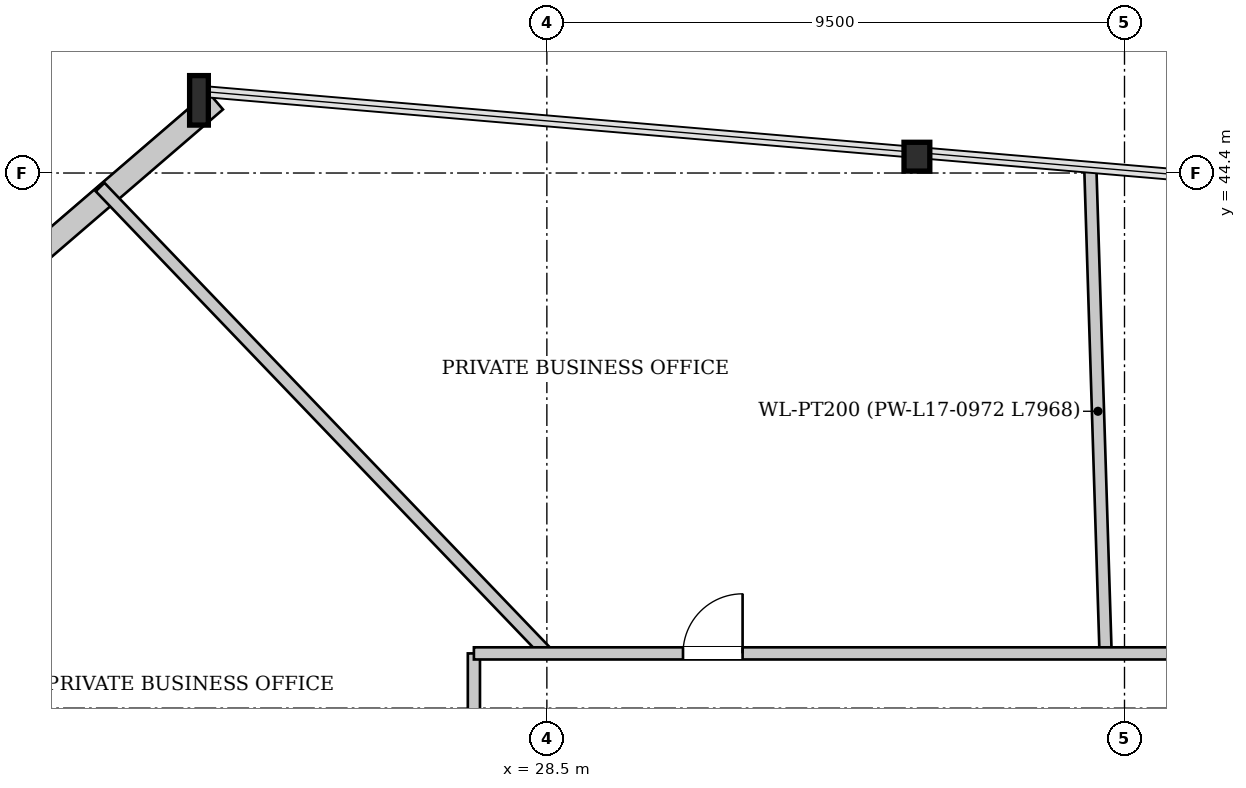
"""IFC4 building model, lengths in metres.
Left out: names, types, materials, properties, quantities, classifications, styles, units other than length and angle.
Written with IfcOpenShell. Run it as: python <this file> out.ifc"""

import sys

from ifc_helpers import new_model, si_unit, direction, frame, frame_2d, origin, origin_2d, place, context, subcontext, project, spatial, rectangle, i_section, extrude, source, transform, mapped, element, fill, save


model = new_model("IFC4")
c1 = context("Model", 3, precision=1e-05, world=origin(), true_north=direction((0.0, 1.0)))
c2 = subcontext(c1, "Body", "Model", "MODEL_VIEW")
j1 = project(units=[si_unit("LENGTHUNIT", "METRE"), si_unit("PLANEANGLEUNIT", "RADIAN")], contexts=[c1])
p1 = place(None, origin())
s1 = spatial("IfcSite", under=j1, at=p1, CompositionType="ELEMENT")
p2 = place(p1, origin())
s2 = spatial("IfcBuilding", under=s1, at=p2, CompositionType="ELEMENT")
p3 = place(p2, frame((0.0, 0.0, 68.35)))
s3 = spatial("IfcBuildingStorey", under=s2, at=p3, CompositionType="ELEMENT", Elevation=68.35)
m1 = source(origin(), c2, "Body", "SweptSolid", [
    extrude(i_section(OverallWidth=0.424, OverallDepth=0.474, WebThickness=0.043, FlangeThickness=0.068, at=origin_2d()), origin(), (0.0, 0.0, 1.0), 3.4),
])
p4 = place(p3, frame((34.734, 44.725, 0.0), z_axis=(-0.087319185608, -0.033247354389, 0.995625418142), x_axis=(0.355835526265, -0.93454859598, 0.0)))
e1 = element("IfcColumn", 1, at=p4, inside=s3, PredefinedType="COLUMN", context=c2, shape_type="MappedRepresentation", body=[
    mapped(m1, transform((0.0, 0.0, 0.0), x_axis=(1.0, 0.0, 0.0), y_axis=(0.0, 1.0, 0.0), z_axis=(0.0, 0.0, 1.0), scale=1.0)),
])
m2 = source(origin(), c2, "Body", "SweptSolid", [
    extrude(i_section(OverallWidth=0.308, OverallDepth=0.814, WebThickness=0.021, FlangeThickness=0.04, at=origin_2d()), origin(), (0.0, 0.0, 1.0), 3.409),
])
p5 = place(p3, frame((22.925, 45.734, 0.0), z_axis=(-0.086153434575, -0.081426812229, 0.992948770059), x_axis=(0.686889577708, -0.726761795939, 0.0)))
e2 = element("IfcColumn", 2, at=p5, inside=s3, PredefinedType="COLUMN", context=c2, shape_type="MappedRepresentation", body=[
    mapped(m2, transform((0.0, 0.0, 0.0), x_axis=(1.0, 0.0, 0.0), y_axis=(0.0, 1.0, 0.0), z_axis=(0.0, 0.0, 1.0), scale=1.0)),
])
p6 = place(p3, frame((18.425, 41.612, 0.0), z_axis=(0.0, 0.0, 1.0), x_axis=(0.758105656075, 0.652131746066, 0.0)))
e3 = element("IfcWall", 3, at=p6, inside=s3, PredefinedType="SOLIDWALL", context=c2, shape_type="SweptSolid", body=[
    extrude(rectangle(XDim=6.1, YDim=0.38, at=frame_2d((3.05, 0.0))), origin(), (0.0, 0.0, 1.0), 2.592),
])
p7 = place(p3, frame((37.689, 36.5, 0.0), z_axis=(0.0, 0.0, 1.0), x_axis=(-0.031407900808, 0.999506650186, 0.0)))
e4 = element("IfcWall", 4, at=p7, inside=s3, PredefinedType="PARTITIONING", context=c2, shape_type="SweptSolid", body=[
    extrude(rectangle(XDim=7.968, YDim=0.2, at=frame_2d((3.984, 0.0))), origin(), (0.0, 0.0, 1.0), 3.3),
])
p8 = place(p3, frame((28.506, 36.5, 0.0), z_axis=(0.0, 0.0, 1.0), x_axis=(-0.692130904917, 0.721771993402, 0.0)))
e5 = element("IfcWall", 5, at=p8, inside=s3, PredefinedType="PARTITIONING", context=c2, shape_type="SweptSolid", body=[
    extrude(rectangle(XDim=10.625, YDim=0.2, at=frame_2d((5.312, 0.0))), origin(), (0.0, 0.0, 1.0), 3.3),
])
p9 = place(p3, frame((27.3, 16.7, 0.0), z_axis=(0.0, 0.0, 1.0), x_axis=(0.0, 1.0, 0.0)))
e6 = element("IfcWall", 6, at=p9, inside=s3, PredefinedType="PARTITIONING", context=c2, shape_type="SweptSolid", body=[
    extrude(rectangle(XDim=19.8, YDim=0.2, at=frame_2d((9.9, 0.0))), origin(), (0.0, 0.0, 1.0), 3.3),
])
p10 = place(p9, frame((15.13, 0.0, 0.0)))
e7 = element("IfcOpeningElement", 7, at=p10, cuts=e6, PredefinedType="OPENING", context=c2, shape_type="SweptSolid", body=[
    extrude(rectangle(XDim=0.98, YDim=2.15, at=frame_2d((0.49, 1.075))), frame((0.0, 0.11, 0.0), z_axis=(0.0, -1.0, 0.0), x_axis=(1.0, 0.0, 0.0)), (0.0, 0.0, 1.0), 0.22),
])
p11 = place(p9, frame((3.667, 0.0, 0.0)))
e8 = element("IfcOpeningElement", 8, at=p11, cuts=e6, PredefinedType="OPENING", context=c2, shape_type="SweptSolid", body=[
    extrude(rectangle(XDim=0.98, YDim=2.15, at=frame_2d((0.49, 1.075))), frame((0.0, 0.11, 0.0), z_axis=(0.0, -1.0, 0.0), x_axis=(1.0, 0.0, 0.0)), (0.0, 0.0, 1.0), 0.22),
])
p12 = place(p3, frame((27.3, 36.5, 0.0), z_axis=(0.0, 0.0, 1.0), x_axis=(1.0, 0.0, 0.0)))
e9 = element("IfcWall", 9, at=p12, inside=s3, PredefinedType="PARTITIONING", context=c2, shape_type="SweptSolid", body=[
    extrude(rectangle(XDim=21.4, YDim=0.2, at=frame_2d((10.7, 0.0))), origin(), (0.0, 0.0, 1.0), 3.3),
])
p13 = place(p12, frame((3.439, 0.0, 0.0)))
e10 = element("IfcOpeningElement", 10, at=p13, cuts=e9, PredefinedType="OPENING", context=c2, shape_type="SweptSolid", body=[
    extrude(rectangle(XDim=0.98, YDim=2.15, at=frame_2d((0.49, 1.075))), frame((0.0, 0.11, 0.0), z_axis=(0.0, -1.0, 0.0), x_axis=(1.0, 0.0, 0.0)), (0.0, 0.0, 1.0), 0.22),
])
p14 = place(p12, frame((20.12, 0.0, 0.0)))
e11 = element("IfcOpeningElement", 11, at=p14, cuts=e9, PredefinedType="OPENING", context=c2, shape_type="SweptSolid", body=[
    extrude(rectangle(XDim=0.98, YDim=2.15, at=frame_2d((0.49, 1.075))), frame((0.0, 0.11, 0.0), z_axis=(0.0, -1.0, 0.0), x_axis=(1.0, 0.0, 0.0)), (0.0, 0.0, 1.0), 0.22),
])
p15 = place(p12, frame((13.104, 0.0, 0.0)))
e12 = element("IfcOpeningElement", 12, at=p15, cuts=e9, PredefinedType="OPENING", context=c2, shape_type="SweptSolid", body=[
    extrude(rectangle(XDim=0.98, YDim=2.15, at=frame_2d((0.49, 1.075))), frame((0.0, 0.11, 0.0), z_axis=(0.0, -1.0, 0.0), x_axis=(1.0, 0.0, 0.0)), (0.0, 0.0, 1.0), 0.22),
])
m3 = source(origin(), c2, "Body", "SweptSolid", [
    extrude(rectangle(XDim=0.98, YDim=2.15, at=frame_2d((0.49, 1.075))), frame((0.0, 0.025, 0.0), z_axis=(0.0, -1.0, 0.0), x_axis=(1.0, 0.0, 0.0)), (0.0, 0.0, 1.0), 0.05),
])
p16 = place(p13, origin())
e13 = element("IfcDoor", 13, at=p16, inside=s3, OperationType="SINGLE_SWING_RIGHT", PredefinedType="DOOR", context=c2, shape_type="MappedRepresentation", body=[
    mapped(m3, transform((0.0, 0.0, 0.0), x_axis=(1.0, 0.0, 0.0), y_axis=(0.0, 1.0, 0.0), z_axis=(0.0, 0.0, 1.0), scale=1.0)),
])
fill(e10, e13)
save(model, sys.argv[1])
